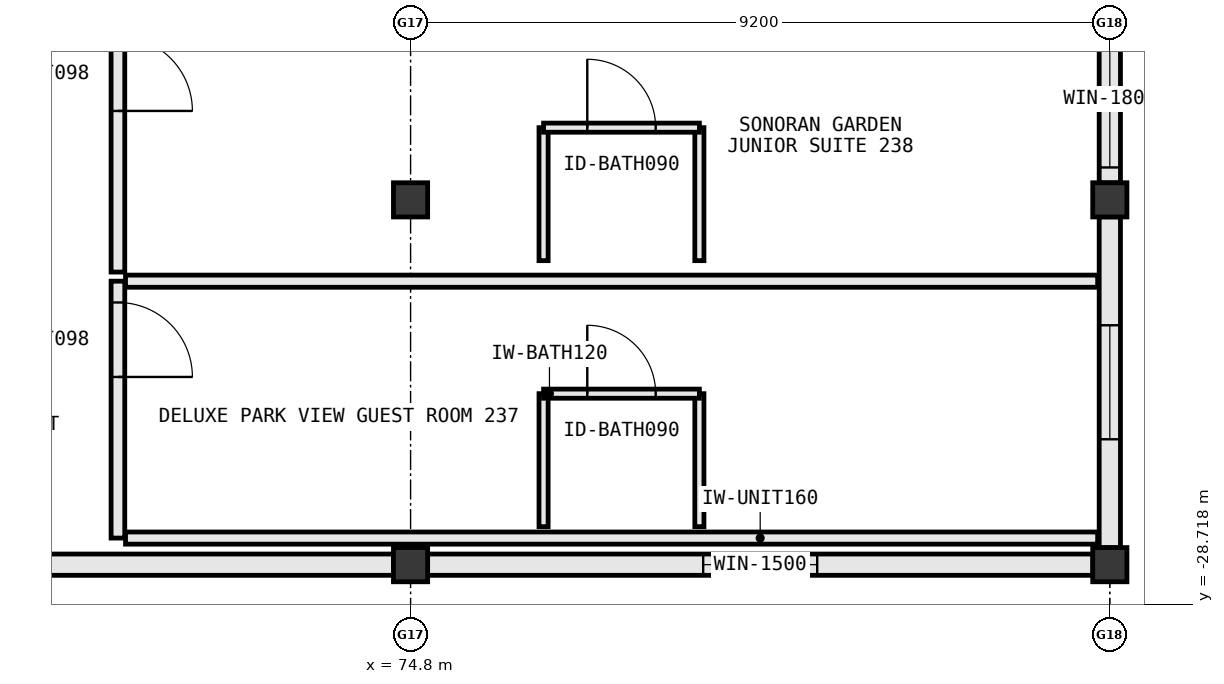
"""IFC4 building model, lengths in metres.
Left out: names, types, materials, properties, quantities, classifications, styles, units other than length and angle.
Written with IfcOpenShell. Run it as: python <this file> out.ifc"""

import sys

from ifc_helpers import new_model, si_unit, direction, frame, frame_2d, origin, origin_2d, place, context, subcontext, project, spatial, rectangle, extrude, element, fill, save


model = new_model("IFC4")
c1 = context("Model", 3, precision=1e-05, world=origin(), true_north=direction((0.0, 1.0)))
c2 = subcontext(c1, "Body", "Model", "MODEL_VIEW")
j1 = project(units=[si_unit("LENGTHUNIT", "METRE"), si_unit("PLANEANGLEUNIT", "RADIAN")], contexts=[c1])
p1 = place(None, origin())
s1 = spatial("IfcSite", under=j1, at=p1, CompositionType="ELEMENT")
p2 = place(p1, origin())
s2 = spatial("IfcBuilding", under=s1, at=p2, CompositionType="ELEMENT")
p3 = place(p2, frame((0.0, 0.0, 35.2)))
s3 = spatial("IfcBuildingStorey", under=s2, at=p3, CompositionType="ELEMENT", Elevation=35.2)
for number, where, z_axis, x_axis in (
    (1, (74.8, -28.2, 0.0), (0.0, 0.0, 1.0), (1.0, 0.0, 0.0)),
    (2, (74.8, -23.4, 0.0), (0.0, 0.0, 1.0), (1.0, 0.0, 0.0)),
    (3, (84.0, -28.2, 0.0), (0.0, 0.0, 1.0), (1.0, 0.0, 0.0)),
    (4, (84.0, -23.4, 0.0), (0.0, 0.0, 1.0), (1.0, 0.0, 0.0)),
):
    element("IfcColumn", number, at=place(p3, frame(where, z_axis=z_axis, x_axis=x_axis)), inside=s3, PredefinedType="COLUMN", context=c2, shape_type="SweptSolid", body=[
        extrude(rectangle(XDim=0.45, YDim=0.45, at=origin_2d()), origin(), (0.0, 0.0, 1.0), 3.8),
    ])
p4 = place(p3, frame((65.6, -28.2, 0.0), z_axis=(0.0, 0.0, 1.0), x_axis=(1.0, 0.0, 0.0)))
e5 = element("IfcWall", 5, at=p4, inside=s3, PredefinedType="STANDARD", context=c2, shape_type="SweptSolid", body=[
    extrude(rectangle(XDim=8.977, YDim=0.28, at=frame_2d((4.488, 0.0))), origin(), (0.0, 0.0, 1.0), 3.565),
])
p5 = place(p3, frame((75.023, -28.2, 0.0), z_axis=(0.0, 0.0, 1.0), x_axis=(1.0, 0.0, 0.0)))
e6 = element("IfcWall", 6, at=p5, inside=s3, PredefinedType="STANDARD", context=c2, shape_type="SweptSolid", body=[
    extrude(rectangle(XDim=8.754, YDim=0.28, at=frame_2d((4.377, 0.0))), origin(), (0.0, 0.0, 1.0), 2.94),
])
p6 = place(p5, frame((3.627, 0.0, 0.85)))
e7 = element("IfcOpeningElement", 7, at=p6, cuts=e6, PredefinedType="OPENING", context=c2, shape_type="SweptSolid", body=[
    extrude(rectangle(XDim=1.5, YDim=1.75, at=frame_2d((0.75, 0.875))), frame((0.0, 0.152, 0.0), z_axis=(0.0, -1.0, 0.0), x_axis=(1.0, 0.0, 0.0)), (0.0, 0.0, 1.0), 0.304),
])
p7 = place(p3, frame((84.0, -27.977, 0.0), z_axis=(0.0, 0.0, 1.0), x_axis=(0.0, 1.0, 0.0)))
e8 = element("IfcWall", 8, at=p7, inside=s3, PredefinedType="STANDARD", context=c2, shape_type="SweptSolid", body=[
    extrude(rectangle(XDim=4.354, YDim=0.28, at=frame_2d((2.177, 0.0))), origin(), (0.0, 0.0, 1.0), 2.98),
])
p8 = place(p7, frame((1.427, 0.0, 0.85)))
e9 = element("IfcOpeningElement", 9, at=p8, cuts=e8, PredefinedType="OPENING", context=c2, shape_type="SweptSolid", body=[
    extrude(rectangle(XDim=1.5, YDim=1.75, at=frame_2d((0.75, 0.875))), frame((0.0, 0.152, 0.0), z_axis=(0.0, -1.0, 0.0), x_axis=(1.0, 0.0, 0.0)), (0.0, 0.0, 1.0), 0.304),
])
p9 = place(p3, frame((84.0, -23.177, 0.0), z_axis=(0.0, 0.0, 1.0), x_axis=(0.0, 1.0, 0.0)))
e10 = element("IfcWall", 10, at=p9, inside=s3, PredefinedType="STANDARD", context=c2, shape_type="SweptSolid", body=[
    extrude(rectangle(XDim=4.354, YDim=0.28, at=frame_2d((2.177, 0.0))), origin(), (0.0, 0.0, 1.0), 2.98),
])
p10 = place(p9, frame((0.204, 0.0, 0.85)))
e11 = element("IfcOpeningElement", 11, at=p10, cuts=e10, PredefinedType="OPENING", context=c2, shape_type="SweptSolid", body=[
    extrude(rectangle(XDim=1.8, YDim=1.85, at=frame_2d((0.9, 0.925))), frame((0.0, 0.152, 0.0), z_axis=(0.0, -1.0, 0.0), x_axis=(1.0, 0.0, 0.0)), (0.0, 0.0, 1.0), 0.304),
])
p11 = place(p9, frame((2.515, 0.0, 0.85)))
e12 = element("IfcOpeningElement", 12, at=p11, cuts=e10, PredefinedType="OPENING", context=c2, shape_type="SweptSolid", body=[
    extrude(rectangle(XDim=1.65, YDim=1.8, at=frame_2d((0.825, 0.9))), frame((0.0, 0.152, 0.0), z_axis=(0.0, -1.0, 0.0), x_axis=(1.0, 0.0, 0.0)), (0.0, 0.0, 1.0), 0.304),
])
p12 = place(p3, frame((70.95, -24.47, 0.0), z_axis=(0.0, 0.0, 1.0), x_axis=(0.0, -1.0, 0.0)))
e13 = element("IfcWall", 13, at=p12, inside=s3, PredefinedType="PARTITIONING", context=c2, shape_type="SweptSolid", body=[
    extrude(rectangle(XDim=3.38, YDim=0.18, at=frame_2d((1.69, 0.0))), origin(), (0.0, 0.0, 1.0), 3.565),
])
p13 = place(p12, frame((0.28, 0.0, 0.0)))
e14 = element("IfcOpeningElement", 14, at=p13, cuts=e13, PredefinedType="OPENING", context=c2, shape_type="SweptSolid", body=[
    extrude(rectangle(XDim=0.98, YDim=2.18, at=frame_2d((0.49, 1.09))), frame((0.0, 0.102, 0.0), z_axis=(0.0, -1.0, 0.0), x_axis=(1.0, 0.0, 0.0)), (0.0, 0.0, 1.0), 0.204),
])
p14 = place(p3, frame((71.05, -27.85, 0.0), z_axis=(0.0, 0.0, 1.0), x_axis=(1.0, 0.0, 0.0)))
e15 = element("IfcWall", 15, at=p14, inside=s3, PredefinedType="PARTITIONING", context=c2, shape_type="SweptSolid", body=[
    extrude(rectangle(XDim=12.79, YDim=0.16, at=frame_2d((6.395, 0.0))), origin(), (0.0, 0.0, 1.0), 2.94),
])
p15 = place(p3, frame((71.05, -24.47, 0.0), z_axis=(0.0, 0.0, 1.0), x_axis=(1.0, 0.0, 0.0)))
e16 = element("IfcWall", 16, at=p15, inside=s3, PredefinedType="PARTITIONING", context=c2, shape_type="SweptSolid", body=[
    extrude(rectangle(XDim=12.79, YDim=0.16, at=frame_2d((6.395, 0.0))), origin(), (0.0, 0.0, 1.0), 3.565),
])
for number, where, z_axis, x_axis in (
    (17, (76.55, -27.7, 0.0), (0.0, 0.0, 1.0), (0.0, 1.0, 0.0)),
    (18, (78.6, -27.7, 0.0), (0.0, 0.0, 1.0), (0.0, 1.0, 0.0)),
):
    element("IfcWall", number, at=place(p3, frame(where, z_axis=z_axis, x_axis=x_axis)), inside=s3, PredefinedType="PARTITIONING", context=c2, shape_type="SweptSolid", body=[
        extrude(rectangle(XDim=1.75, YDim=0.12, at=frame_2d((0.875, 0.0))), origin(), (0.0, 0.0, 1.0), 3.565),
    ])
p16 = place(p3, frame((76.55, -25.95, 0.0), z_axis=(0.0, 0.0, 1.0), x_axis=(1.0, 0.0, 0.0)))
e19 = element("IfcWall", 19, at=p16, inside=s3, PredefinedType="PARTITIONING", context=c2, shape_type="SweptSolid", body=[
    extrude(rectangle(XDim=2.05, YDim=0.12, at=frame_2d((1.025, 0.0))), origin(), (0.0, 0.0, 1.0), 3.565),
])
p17 = place(p16, frame((0.575, 0.0, 0.0)))
e20 = element("IfcOpeningElement", 20, at=p17, cuts=e19, PredefinedType="OPENING", context=c2, shape_type="SweptSolid", body=[
    extrude(rectangle(XDim=0.9, YDim=2.15, at=frame_2d((0.45, 1.075))), frame((0.0, 0.072, 0.0), z_axis=(0.0, -1.0, 0.0), x_axis=(1.0, 0.0, 0.0)), (0.0, 0.0, 1.0), 0.144),
])
p18 = place(p3, frame((70.95, -20.97, 0.0), z_axis=(0.0, 0.0, 1.0), x_axis=(0.0, -1.0, 0.0)))
e21 = element("IfcWall", 21, at=p18, inside=s3, PredefinedType="PARTITIONING", context=c2, shape_type="SweptSolid", body=[
    extrude(rectangle(XDim=3.38, YDim=0.18, at=frame_2d((1.69, 0.0))), origin(), (0.0, 0.0, 1.0), 3.565),
])
p19 = place(p18, frame((0.28, 0.0, 0.0)))
e22 = element("IfcOpeningElement", 22, at=p19, cuts=e21, PredefinedType="OPENING", context=c2, shape_type="SweptSolid", body=[
    extrude(rectangle(XDim=0.98, YDim=2.18, at=frame_2d((0.49, 1.09))), frame((0.0, 0.102, 0.0), z_axis=(0.0, -1.0, 0.0), x_axis=(1.0, 0.0, 0.0)), (0.0, 0.0, 1.0), 0.204),
])
for number, where, z_axis, x_axis in (
    (23, (76.55, -24.2, 0.0), (0.0, 0.0, 1.0), (0.0, 1.0, 0.0)),
    (24, (78.6, -24.2, 0.0), (0.0, 0.0, 1.0), (0.0, 1.0, 0.0)),
):
    element("IfcWall", number, at=place(p3, frame(where, z_axis=z_axis, x_axis=x_axis)), inside=s3, PredefinedType="PARTITIONING", context=c2, shape_type="SweptSolid", body=[
        extrude(rectangle(XDim=1.75, YDim=0.12, at=frame_2d((0.875, 0.0))), origin(), (0.0, 0.0, 1.0), 3.565),
    ])
p20 = place(p3, frame((76.55, -22.45, 0.0), z_axis=(0.0, 0.0, 1.0), x_axis=(1.0, 0.0, 0.0)))
e25 = element("IfcWall", 25, at=p20, inside=s3, PredefinedType="PARTITIONING", context=c2, shape_type="SweptSolid", body=[
    extrude(rectangle(XDim=2.05, YDim=0.12, at=frame_2d((1.025, 0.0))), origin(), (0.0, 0.0, 1.0), 3.565),
])
p21 = place(p20, frame((0.575, 0.0, 0.0)))
e26 = element("IfcOpeningElement", 26, at=p21, cuts=e25, PredefinedType="OPENING", context=c2, shape_type="SweptSolid", body=[
    extrude(rectangle(XDim=0.9, YDim=2.15, at=frame_2d((0.45, 1.075))), frame((0.0, 0.072, 0.0), z_axis=(0.0, -1.0, 0.0), x_axis=(1.0, 0.0, 0.0)), (0.0, 0.0, 1.0), 0.144),
])
p22 = place(p6, origin())
e27 = element("IfcWindow", 27, at=p22, inside=s3, PartitioningType="SINGLE_PANEL", PredefinedType="WINDOW", context=c2, shape_type="SweptSolid", body=[
    extrude(rectangle(XDim=1.5, YDim=1.75, at=frame_2d((0.75, 0.875))), frame((0.0, 0.03, 0.0), z_axis=(0.0, -1.0, 0.0), x_axis=(1.0, 0.0, 0.0)), (0.0, 0.0, 1.0), 0.06),
])
fill(e7, e27)
p23 = place(p8, origin())
e28 = element("IfcWindow", 28, at=p23, inside=s3, PartitioningType="SINGLE_PANEL", PredefinedType="WINDOW", context=c2, shape_type="SweptSolid", body=[
    extrude(rectangle(XDim=1.5, YDim=1.75, at=frame_2d((0.75, 0.875))), frame((0.0, 0.03, 0.0), z_axis=(0.0, -1.0, 0.0), x_axis=(1.0, 0.0, 0.0)), (0.0, 0.0, 1.0), 0.06),
])
fill(e9, e28)
p24 = place(p10, origin())
e29 = element("IfcWindow", 29, at=p24, inside=s3, PartitioningType="SINGLE_PANEL", PredefinedType="WINDOW", context=c2, shape_type="SweptSolid", body=[
    extrude(rectangle(XDim=1.8, YDim=1.85, at=frame_2d((0.9, 0.925))), frame((0.0, 0.03, 0.0), z_axis=(0.0, -1.0, 0.0), x_axis=(1.0, 0.0, 0.0)), (0.0, 0.0, 1.0), 0.06),
])
fill(e11, e29)
p25 = place(p13, origin())
e30 = element("IfcDoor", 30, at=p25, inside=s3, OperationType="SINGLE_SWING_RIGHT", PredefinedType="DOOR", context=c2, shape_type="SweptSolid", body=[
    extrude(rectangle(XDim=0.98, YDim=2.18, at=frame_2d((0.49, 1.09))), frame((0.0, 0.025, 0.0), z_axis=(0.0, -1.0, 0.0), x_axis=(1.0, 0.0, 0.0)), (0.0, 0.0, 1.0), 0.05),
])
fill(e14, e30)
p26 = place(p17, origin())
e31 = element("IfcDoor", 31, at=p26, inside=s3, OperationType="SINGLE_SWING_LEFT", PredefinedType="DOOR", context=c2, shape_type="SweptSolid", body=[
    extrude(rectangle(XDim=0.9, YDim=2.15, at=frame_2d((0.45, 1.075))), frame((0.0, 0.025, 0.0), z_axis=(0.0, -1.0, 0.0), x_axis=(1.0, 0.0, 0.0)), (0.0, 0.0, 1.0), 0.05),
])
fill(e20, e31)
p27 = place(p19, origin())
e32 = element("IfcDoor", 32, at=p27, inside=s3, OperationType="SINGLE_SWING_RIGHT", PredefinedType="DOOR", context=c2, shape_type="SweptSolid", body=[
    extrude(rectangle(XDim=0.98, YDim=2.18, at=frame_2d((0.49, 1.09))), frame((0.0, 0.025, 0.0), z_axis=(0.0, -1.0, 0.0), x_axis=(1.0, 0.0, 0.0)), (0.0, 0.0, 1.0), 0.05),
])
fill(e22, e32)
p28 = place(p21, origin())
e33 = element("IfcDoor", 33, at=p28, inside=s3, OperationType="SINGLE_SWING_LEFT", PredefinedType="DOOR", context=c2, shape_type="SweptSolid", body=[
    extrude(rectangle(XDim=0.9, YDim=2.15, at=frame_2d((0.45, 1.075))), frame((0.0, 0.025, 0.0), z_axis=(0.0, -1.0, 0.0), x_axis=(1.0, 0.0, 0.0)), (0.0, 0.0, 1.0), 0.05),
])
fill(e26, e33)
save(model, sys.argv[1])
